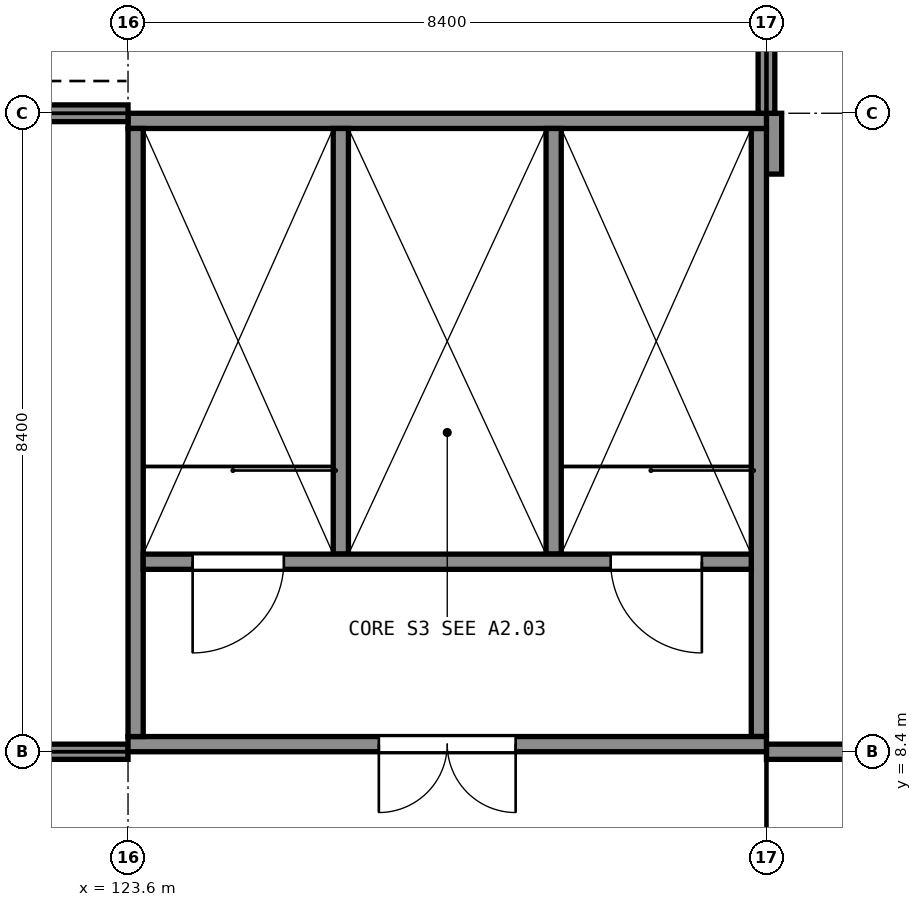
"""IFC4 building model, lengths in metres.
Left out: names, types, materials, properties, quantities, classifications, styles, units other than length and angle.
Written with IfcOpenShell. Run it as: python <this file> out.ifc"""

import sys

from ifc_helpers import new_model, si_unit, direction, frame, frame_2d, origin, place, context, subcontext, project, spatial, polyline, rectangle, outline, extrude, element, fill, save


model = new_model("IFC4")
c1 = context("Model", 3, precision=1e-05, world=origin(), true_north=direction((0.0, 1.0)))
c2 = subcontext(c1, "Body", "Model", "MODEL_VIEW")
j1 = project(units=[si_unit("LENGTHUNIT", "METRE"), si_unit("PLANEANGLEUNIT", "RADIAN")], contexts=[c1])
p1 = place(None, origin())
s1 = spatial("IfcSite", under=j1, at=p1, CompositionType="ELEMENT")
p2 = place(p1, origin())
s2 = spatial("IfcBuilding", under=s1, at=p2, CompositionType="ELEMENT")
p3 = place(p2, frame((0.0, 0.0, 25.0)))
s3 = spatial("IfcBuildingStorey", under=s2, at=p3, CompositionType="ELEMENT", Elevation=25.0)
p4 = place(p3, frame((123.6, 8.5, 0.0), z_axis=(0.0, 0.0, 1.0), x_axis=(1.0, 0.0, 0.0)))
e1 = element("IfcWall", 1, at=p4, inside=s3, PredefinedType="SHEAR", context=c2, shape_type="SweptSolid", body=[
    extrude(rectangle(XDim=8.4, YDim=0.2, at=frame_2d((4.2, 0.0))), origin(), (0.0, 0.0, 1.0), 7.097),
])
p5 = place(p4, frame((3.3, 0.0, 0.0)))
e2 = element("IfcOpeningElement", 2, at=p5, cuts=e1, PredefinedType="OPENING", context=c2, shape_type="SweptSolid", body=[
    extrude(rectangle(XDim=1.8, YDim=2.1, at=frame_2d((0.9, 1.05))), frame((0.0, 0.11, 0.0), z_axis=(0.0, -1.0, 0.0), x_axis=(1.0, 0.0, 0.0)), (0.0, 0.0, 1.0), 0.22),
])
p6 = place(p3, frame((123.6, 16.7, 0.0), z_axis=(0.0, 0.0, 1.0), x_axis=(1.0, 0.0, 0.0)))
e3 = element("IfcWall", 3, at=p6, inside=s3, PredefinedType="SHEAR", context=c2, shape_type="SweptSolid", body=[
    extrude(rectangle(XDim=8.4, YDim=0.2, at=frame_2d((4.2, 0.0))), origin(), (0.0, 0.0, 1.0), 4.433),
])
for number, where, z_axis, x_axis in (
    (4, (123.7, 8.6, 0.0), (0.0, 0.0, 1.0), (0.0, 1.0, 0.0)),
    (5, (131.9, 8.6, 0.0), (0.0, 0.0, 1.0), (0.0, 1.0, 0.0)),
):
    element("IfcWall", number, at=place(p3, frame(where, z_axis=z_axis, x_axis=x_axis)), inside=s3, PredefinedType="SHEAR", context=c2, shape_type="SweptSolid", body=[
        extrude(outline(polyline([(0.0, 0.0), (8.0, 0.0), (8.0, 4.465), (7.704, 4.561), (7.407, 4.658), (6.519, 4.946), (6.222, 5.043), (5.333, 5.331), (5.037, 5.428), (4.444, 5.62), (4.148, 5.717), (3.259, 6.005), (2.963, 6.102), (2.074, 6.39), (1.778, 6.487), (1.185, 6.679), (0.889, 6.776), (0.0, 7.064), (0.0, 0.0)])), frame((0.0, 0.1, 0.0), z_axis=(0.0, -1.0, 0.0), x_axis=(1.0, 0.0, 0.0)), (0.0, 0.0, 1.0), 0.2),
    ])
p7 = place(p3, frame((123.8, 10.9, 0.0), z_axis=(0.0, 0.0, 1.0), x_axis=(1.0, 0.0, 0.0)))
e6 = element("IfcWall", 6, at=p7, inside=s3, PredefinedType="SHEAR", context=c2, shape_type="SweptSolid", body=[
    extrude(rectangle(XDim=8.0, YDim=0.2, at=frame_2d((4.0, 0.0))), origin(), (0.0, 0.0, 1.0), 6.317),
])
p8 = place(p7, frame((0.65, 0.0, 0.0)))
e7 = element("IfcOpeningElement", 7, at=p8, cuts=e6, PredefinedType="OPENING", context=c2, shape_type="SweptSolid", body=[
    extrude(rectangle(XDim=1.2, YDim=2.1, at=frame_2d((0.6, 1.05))), frame((0.0, 0.11, 0.0), z_axis=(0.0, -1.0, 0.0), x_axis=(1.0, 0.0, 0.0)), (0.0, 0.0, 1.0), 0.22),
])
p9 = place(p7, frame((6.15, 0.0, 0.0)))
e8 = element("IfcOpeningElement", 8, at=p9, cuts=e6, PredefinedType="OPENING", context=c2, shape_type="SweptSolid", body=[
    extrude(rectangle(XDim=1.2, YDim=2.1, at=frame_2d((0.6, 1.05))), frame((0.0, 0.11, 0.0), z_axis=(0.0, -1.0, 0.0), x_axis=(1.0, 0.0, 0.0)), (0.0, 0.0, 1.0), 0.22),
])
for number, where, z_axis, x_axis in (
    (9, (126.4, 11.0, 0.0), (0.0, 0.0, 1.0), (0.0, 1.0, 0.0)),
    (10, (129.2, 11.0, 0.0), (0.0, 0.0, 1.0), (0.0, 1.0, 0.0)),
):
    element("IfcWall", number, at=place(p3, frame(where, z_axis=z_axis, x_axis=x_axis)), inside=s3, PredefinedType="SHEAR", context=c2, shape_type="SweptSolid", body=[
        extrude(outline(polyline([(0.0, 0.0), (5.6, 0.0), (5.6, 4.465), (5.01, 4.657), (4.716, 4.752), (3.832, 5.04), (3.537, 5.135), (2.653, 5.423), (2.358, 5.518), (1.474, 5.806), (1.179, 5.901), (0.0, 6.285), (0.0, 0.0)])), frame((0.0, 0.1, 0.0), z_axis=(0.0, -1.0, 0.0), x_axis=(1.0, 0.0, 0.0)), (0.0, 0.0, 1.0), 0.2),
    ])
p10 = place(p3, frame((132.0, 16.8, 0.0), z_axis=(0.0, 0.0, 1.0), x_axis=(0.0, 1.0, 0.0)))
e11 = element("IfcWall", 11, at=p10, inside=s3, PredefinedType="SOLIDWALL", context=c2, shape_type="SweptSolid", body=[
    extrude(rectangle(XDim=8.1, YDim=0.22, at=frame_2d((4.05, 0.0))), origin(), (0.0, 0.0, 1.0), 9.709),
])
p11 = place(p10, frame((2.25, 0.0, 0.9)))
e12 = element("IfcOpeningElement", 12, at=p11, cuts=e11, PredefinedType="OPENING", context=c2, shape_type="SweptSolid", body=[
    extrude(rectangle(XDim=3.6, YDim=1.5, at=frame_2d((1.8, 0.75))), frame((0.0, 0.12, 0.0), z_axis=(0.0, -1.0, 0.0), x_axis=(1.0, 0.0, 0.0)), (0.0, 0.0, 1.0), 0.24),
])
p12 = place(p3, frame((115.5, 16.8, 0.0), z_axis=(0.0, 0.0, 1.0), x_axis=(1.0, 0.0, 0.0)))
e13 = element("IfcWall", 13, at=p12, inside=s3, PredefinedType="SOLIDWALL", context=c2, shape_type="SweptSolid", body=[
    extrude(rectangle(XDim=8.1, YDim=0.22, at=frame_2d((4.05, 0.0))), origin(), (0.0, 0.0, 1.0), 4.334),
])
p13 = place(p12, frame((2.25, 0.0, 0.9)))
e14 = element("IfcOpeningElement", 14, at=p13, cuts=e13, PredefinedType="OPENING", context=c2, shape_type="SweptSolid", body=[
    extrude(rectangle(XDim=3.6, YDim=1.5, at=frame_2d((1.8, 0.75))), frame((0.0, 0.12, 0.0), z_axis=(0.0, -1.0, 0.0), x_axis=(1.0, 0.0, 0.0)), (0.0, 0.0, 1.0), 0.24),
])
p14 = place(p3, frame((132.09, 16.0, 4.99), z_axis=(0.0, 0.0, 1.0), x_axis=(0.0, 1.0, 0.0)))
e15 = element("IfcWall", 15, at=p14, inside=s3, PredefinedType="SOLIDWALL", context=c2, shape_type="SweptSolid", body=[
    extrude(rectangle(XDim=0.8, YDim=0.22, at=frame_2d((0.4, 0.0))), origin(), (0.0, 0.0, 1.0), 4.685),
])
p15 = place(p3, frame((132.0, 8.4, 0.0), z_axis=(0.0, 0.0, 1.0), x_axis=(1.0, 0.0, 0.0)))
e16 = element("IfcWall", 16, at=p15, inside=s3, PredefinedType="PARTITIONING", context=c2, shape_type="SweptSolid", body=[
    extrude(outline(polyline([(0.0, 0.0), (8.1, 0.0), (8.1, 7.567), (7.35, 7.694), (6.3, 7.917), (5.25, 8.141), (1.05, 9.033), (0.0, 9.225), (0.0, 0.0)])), frame((0.0, 0.1, 0.0), z_axis=(0.0, -1.0, 0.0), x_axis=(1.0, 0.0, 0.0)), (0.0, 0.0, 1.0), 0.2),
])
p16 = place(p3, frame((115.5, 8.4, 0.0), z_axis=(0.0, 0.0, 1.0), x_axis=(1.0, 0.0, 0.0)))
e17 = element("IfcWall", 17, at=p16, inside=s3, PredefinedType="PARTITIONING", context=c2, shape_type="SweptSolid", body=[
    extrude(outline(polyline([(0.0, 0.0), (8.1, 0.0), (8.1, 6.629), (6.3, 6.629), (5.25, 3.091), (4.2, 6.629), (2.1, 6.629), (1.05, 3.091), (0.0, 6.629), (0.0, 0.0)])), frame((0.0, 0.1, 0.0), z_axis=(0.0, -1.0, 0.0), x_axis=(1.0, 0.0, 0.0)), (0.0, 0.0, 1.0), 0.2),
])
p17 = place(p16, frame((4.975, 0.0, 0.0)))
e18 = element("IfcOpeningElement", 18, at=p17, cuts=e17, PredefinedType="OPENING", context=c2, shape_type="SweptSolid", body=[
    extrude(rectangle(XDim=1.8, YDim=2.1, at=frame_2d((0.9, 1.05))), frame((0.0, 0.11, 0.0), z_axis=(0.0, -1.0, 0.0), x_axis=(1.0, 0.0, 0.0)), (0.0, 0.0, 1.0), 0.22),
])
p18 = place(p5, origin())
e19 = element("IfcDoor", 19, at=p18, inside=s3, OperationType="DOUBLE_DOOR_SINGLE_SWING", PredefinedType="DOOR", context=c2, shape_type="SweptSolid", body=[
    extrude(rectangle(XDim=1.8, YDim=2.1, at=frame_2d((0.9, 1.05))), frame((0.0, 0.025, 0.0), z_axis=(0.0, -1.0, 0.0), x_axis=(1.0, 0.0, 0.0)), (0.0, 0.0, 1.0), 0.05),
])
fill(e2, e19)
p19 = place(p8, origin())
e20 = element("IfcDoor", 20, at=p19, inside=s3, OperationType="SINGLE_SWING_LEFT", PredefinedType="DOOR", context=c2, shape_type="SweptSolid", body=[
    extrude(rectangle(XDim=1.2, YDim=2.1, at=frame_2d((0.6, 1.05))), frame((0.0, 0.025, 0.0), z_axis=(0.0, -1.0, 0.0), x_axis=(1.0, 0.0, 0.0)), (0.0, 0.0, 1.0), 0.05),
])
fill(e7, e20)
p20 = place(p9, origin())
e21 = element("IfcDoor", 21, at=p20, inside=s3, OperationType="SINGLE_SWING_RIGHT", PredefinedType="DOOR", context=c2, shape_type="SweptSolid", body=[
    extrude(rectangle(XDim=1.2, YDim=2.1, at=frame_2d((0.6, 1.05))), frame((0.0, 0.025, 0.0), z_axis=(0.0, -1.0, 0.0), x_axis=(1.0, 0.0, 0.0)), (0.0, 0.0, 1.0), 0.05),
])
fill(e8, e21)
save(model, sys.argv[1])
